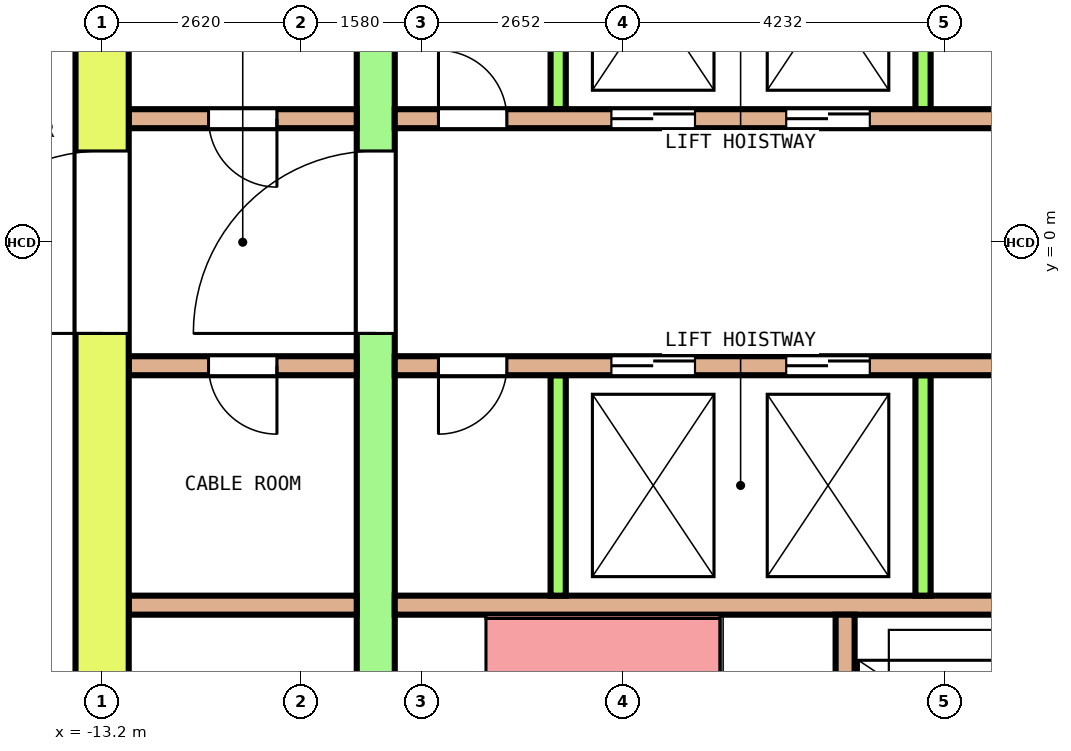
"""IFC4 building model, lengths in metres.
Left out: names, types, materials, properties, quantities, classifications, styles, units other than length and angle.
Written with IfcOpenShell. Run it as: python <this file> out.ifc"""

import sys

from ifc_helpers import new_model, si_unit, direction, frame, frame_2d, origin, place, context, subcontext, project, spatial, rectangle, extrude, element, fill, save


model = new_model("IFC4")
c1 = context("Model", 3, precision=1e-05, world=origin(), true_north=direction((0.0, 1.0)))
c2 = subcontext(c1, "Body", "Model", "MODEL_VIEW")
j1 = project(units=[si_unit("LENGTHUNIT", "METRE"), si_unit("PLANEANGLEUNIT", "RADIAN")], contexts=[c1])
p1 = place(None, origin())
s1 = spatial("IfcSite", under=j1, at=p1, CompositionType="ELEMENT")
p2 = place(p1, origin())
s2 = spatial("IfcBuilding", under=s1, at=p2, CompositionType="ELEMENT")
p3 = place(p2, frame((0.0, 0.0, 176.0)))
s3 = spatial("IfcBuildingStorey", under=s2, at=p3, CompositionType="ELEMENT", Elevation=176.0)
p4 = place(p3, frame((-13.2, -7.75, 0.0), z_axis=(0.0, 0.0, 1.0), x_axis=(0.0, 1.0, 0.0)))
e1 = element("IfcWall", 1, at=p4, inside=s3, PredefinedType="SHEAR", context=c2, shape_type="SweptSolid", body=[
    extrude(rectangle(XDim=15.5, YDim=0.7, at=frame_2d((7.75, 0.0))), origin(), (0.0, 0.0, 1.0), 4.1),
])
p5 = place(p4, frame((6.55, 0.0, 0.0)))
e2 = element("IfcOpeningElement", 2, at=p5, cuts=e1, PredefinedType="OPENING", context=c2, shape_type="SweptSolid", body=[
    extrude(rectangle(XDim=2.4, YDim=2.1, at=frame_2d((1.2, 1.05))), frame((0.0, 0.36, 0.0), z_axis=(0.0, -1.0, 0.0), x_axis=(1.0, 0.0, 0.0)), (0.0, 0.0, 1.0), 0.72),
])
p6 = place(p4, frame((13.45, 0.0, 0.0)))
e3 = element("IfcOpeningElement", 3, at=p6, cuts=e1, PredefinedType="OPENING", context=c2, shape_type="SweptSolid", body=[
    extrude(rectangle(XDim=1.2, YDim=2.1, at=frame_2d((0.6, 1.05))), frame((0.0, 0.36, 0.0), z_axis=(0.0, -1.0, 0.0), x_axis=(1.0, 0.0, 0.0)), (0.0, 0.0, 1.0), 0.72),
])
p7 = place(p4, frame((0.85, 0.0, 0.0)))
e4 = element("IfcOpeningElement", 4, at=p7, cuts=e1, PredefinedType="OPENING", context=c2, shape_type="SweptSolid", body=[
    extrude(rectangle(XDim=1.2, YDim=2.1, at=frame_2d((0.6, 1.05))), frame((0.0, 0.36, 0.0), z_axis=(0.0, -1.0, 0.0), x_axis=(1.0, 0.0, 0.0)), (0.0, 0.0, 1.0), 0.72),
])
p8 = place(p3, frame((-9.6, -7.75, 0.0), z_axis=(0.0, 0.0, 1.0), x_axis=(0.0, 1.0, 0.0)))
e5 = element("IfcWall", 5, at=p8, inside=s3, PredefinedType="SHEAR", context=c2, shape_type="SweptSolid", body=[
    extrude(rectangle(XDim=15.5, YDim=0.5, at=frame_2d((7.75, 0.0))), origin(), (0.0, 0.0, 1.0), 4.1),
])
p9 = place(p8, frame((6.55, 0.0, 0.0)))
e6 = element("IfcOpeningElement", 6, at=p9, cuts=e5, PredefinedType="OPENING", context=c2, shape_type="SweptSolid", body=[
    extrude(rectangle(XDim=2.4, YDim=2.1, at=frame_2d((1.2, 1.05))), frame((0.0, 0.26, 0.0), z_axis=(0.0, -1.0, 0.0), x_axis=(1.0, 0.0, 0.0)), (0.0, 0.0, 1.0), 0.52),
])
p10 = place(p8, frame((13.45, 0.0, 0.0)))
e7 = element("IfcOpeningElement", 7, at=p10, cuts=e5, PredefinedType="OPENING", context=c2, shape_type="SweptSolid", body=[
    extrude(rectangle(XDim=1.2, YDim=2.1, at=frame_2d((0.6, 1.05))), frame((0.0, 0.26, 0.0), z_axis=(0.0, -1.0, 0.0), x_axis=(1.0, 0.0, 0.0)), (0.0, 0.0, 1.0), 0.52),
])
p11 = place(p8, frame((0.85, 0.0, 0.0)))
e8 = element("IfcOpeningElement", 8, at=p11, cuts=e5, PredefinedType="OPENING", context=c2, shape_type="SweptSolid", body=[
    extrude(rectangle(XDim=1.2, YDim=2.1, at=frame_2d((0.6, 1.05))), frame((0.0, 0.26, 0.0), z_axis=(0.0, -1.0, 0.0), x_axis=(1.0, 0.0, 0.0)), (0.0, 0.0, 1.0), 0.52),
])
p12 = place(p3, frame((-12.85, 1.625, 0.0), z_axis=(0.0, 0.0, 1.0), x_axis=(1.0, 0.0, 0.0)))
e9 = element("IfcWall", 9, at=p12, inside=s3, PredefinedType="SOLIDWALL", context=c2, shape_type="SweptSolid", body=[
    extrude(rectangle(XDim=3.0, YDim=0.25, at=frame_2d((1.5, 0.0))), origin(), (0.0, 0.0, 1.0), 4.1),
])
p13 = place(p12, frame((1.05, 0.0, 0.0)))
e10 = element("IfcOpeningElement", 10, at=p13, cuts=e9, PredefinedType="OPENING", context=c2, shape_type="SweptSolid", body=[
    extrude(rectangle(XDim=0.9, YDim=2.1, at=frame_2d((0.45, 1.05))), frame((0.0, 0.135, 0.0), z_axis=(0.0, -1.0, 0.0), x_axis=(1.0, 0.0, 0.0)), (0.0, 0.0, 1.0), 0.27),
])
p14 = place(p3, frame((-9.35, 1.625, 0.0), z_axis=(0.0, 0.0, 1.0), x_axis=(1.0, 0.0, 0.0)))
e11 = element("IfcWall", 11, at=p14, inside=s3, PredefinedType="SOLIDWALL", context=c2, shape_type="SweptSolid", body=[
    extrude(rectangle(XDim=18.7, YDim=0.25, at=frame_2d((9.35, 0.0))), origin(), (0.0, 0.0, 1.0), 4.1),
])
p15 = place(p14, frame((2.85, 0.0, 0.0)))
e12 = element("IfcOpeningElement", 12, at=p15, cuts=e11, PredefinedType="OPENING", context=c2, shape_type="SweptSolid", body=[
    extrude(rectangle(XDim=1.1, YDim=2.1, at=frame_2d((0.55, 1.05))), frame((0.0, 0.135, 0.0), z_axis=(0.0, -1.0, 0.0), x_axis=(1.0, 0.0, 0.0)), (0.0, 0.0, 1.0), 0.27),
])
p16 = place(p14, frame((5.15, 0.0, 0.0)))
e13 = element("IfcOpeningElement", 13, at=p16, cuts=e11, PredefinedType="OPENING", context=c2, shape_type="SweptSolid", body=[
    extrude(rectangle(XDim=1.1, YDim=2.1, at=frame_2d((0.55, 1.05))), frame((0.0, 0.135, 0.0), z_axis=(0.0, -1.0, 0.0), x_axis=(1.0, 0.0, 0.0)), (0.0, 0.0, 1.0), 0.27),
])
p17 = place(p14, frame((14.8, 0.0, 0.0)))
e14 = element("IfcOpeningElement", 14, at=p17, cuts=e11, PredefinedType="OPENING", context=c2, shape_type="SweptSolid", body=[
    extrude(rectangle(XDim=1.1, YDim=2.1, at=frame_2d((0.55, 1.05))), frame((0.0, 0.135, 0.0), z_axis=(0.0, -1.0, 0.0), x_axis=(1.0, 0.0, 0.0)), (0.0, 0.0, 1.0), 0.27),
])
p18 = place(p14, frame((0.575, 0.0, 0.0)))
e15 = element("IfcOpeningElement", 15, at=p18, cuts=e11, PredefinedType="OPENING", context=c2, shape_type="SweptSolid", body=[
    extrude(rectangle(XDim=0.9, YDim=2.1, at=frame_2d((0.45, 1.05))), frame((0.0, 0.135, 0.0), z_axis=(0.0, -1.0, 0.0), x_axis=(1.0, 0.0, 0.0)), (0.0, 0.0, 1.0), 0.27),
])
p19 = place(p14, frame((17.225, 0.0, 0.0)))
e16 = element("IfcOpeningElement", 16, at=p19, cuts=e11, PredefinedType="OPENING", context=c2, shape_type="SweptSolid", body=[
    extrude(rectangle(XDim=0.9, YDim=2.1, at=frame_2d((0.45, 1.05))), frame((0.0, 0.135, 0.0), z_axis=(0.0, -1.0, 0.0), x_axis=(1.0, 0.0, 0.0)), (0.0, 0.0, 1.0), 0.27),
])
for number, where, z_axis, x_axis in (
    (17, (-7.2, 1.75, 0.0), (0.0, 0.0, 1.0), (0.0, 1.0, 0.0)),
    (18, (-2.4, 1.75, 0.0), (0.0, 0.0, 1.0), (0.0, 1.0, 0.0)),
):
    element("IfcWall", number, at=place(p3, frame(where, z_axis=z_axis, x_axis=x_axis)), inside=s3, PredefinedType="SOLIDWALL", context=c2, shape_type="SweptSolid", body=[
        extrude(rectangle(XDim=2.9, YDim=0.2, at=frame_2d((1.45, 0.0))), origin(), (0.0, 0.0, 1.0), 4.1),
    ])
p20 = place(p3, frame((-12.85, -1.625, 0.0), z_axis=(0.0, 0.0, 1.0), x_axis=(1.0, 0.0, 0.0)))
e19 = element("IfcWall", 19, at=p20, inside=s3, PredefinedType="SOLIDWALL", context=c2, shape_type="SweptSolid", body=[
    extrude(rectangle(XDim=3.0, YDim=0.25, at=frame_2d((1.5, 0.0))), origin(), (0.0, 0.0, 1.0), 4.1),
])
p21 = place(p20, frame((1.05, 0.0, 0.0)))
e20 = element("IfcOpeningElement", 20, at=p21, cuts=e19, PredefinedType="OPENING", context=c2, shape_type="SweptSolid", body=[
    extrude(rectangle(XDim=0.9, YDim=2.1, at=frame_2d((0.45, 1.05))), frame((0.0, 0.135, 0.0), z_axis=(0.0, -1.0, 0.0), x_axis=(1.0, 0.0, 0.0)), (0.0, 0.0, 1.0), 0.27),
])
p22 = place(p3, frame((-9.35, -1.625, 0.0), z_axis=(0.0, 0.0, 1.0), x_axis=(1.0, 0.0, 0.0)))
e21 = element("IfcWall", 21, at=p22, inside=s3, PredefinedType="SOLIDWALL", context=c2, shape_type="SweptSolid", body=[
    extrude(rectangle(XDim=18.7, YDim=0.25, at=frame_2d((9.35, 0.0))), origin(), (0.0, 0.0, 1.0), 4.1),
])
p23 = place(p22, frame((2.85, 0.0, 0.0)))
e22 = element("IfcOpeningElement", 22, at=p23, cuts=e21, PredefinedType="OPENING", context=c2, shape_type="SweptSolid", body=[
    extrude(rectangle(XDim=1.1, YDim=2.1, at=frame_2d((0.55, 1.05))), frame((0.0, 0.135, 0.0), z_axis=(0.0, -1.0, 0.0), x_axis=(1.0, 0.0, 0.0)), (0.0, 0.0, 1.0), 0.27),
])
p24 = place(p22, frame((5.15, 0.0, 0.0)))
e23 = element("IfcOpeningElement", 23, at=p24, cuts=e21, PredefinedType="OPENING", context=c2, shape_type="SweptSolid", body=[
    extrude(rectangle(XDim=1.1, YDim=2.1, at=frame_2d((0.55, 1.05))), frame((0.0, 0.135, 0.0), z_axis=(0.0, -1.0, 0.0), x_axis=(1.0, 0.0, 0.0)), (0.0, 0.0, 1.0), 0.27),
])
p25 = place(p22, frame((14.8, 0.0, 0.0)))
e24 = element("IfcOpeningElement", 24, at=p25, cuts=e21, PredefinedType="OPENING", context=c2, shape_type="SweptSolid", body=[
    extrude(rectangle(XDim=1.1, YDim=2.1, at=frame_2d((0.55, 1.05))), frame((0.0, 0.135, 0.0), z_axis=(0.0, -1.0, 0.0), x_axis=(1.0, 0.0, 0.0)), (0.0, 0.0, 1.0), 0.27),
])
p26 = place(p22, frame((0.575, 0.0, 0.0)))
e25 = element("IfcOpeningElement", 25, at=p26, cuts=e21, PredefinedType="OPENING", context=c2, shape_type="SweptSolid", body=[
    extrude(rectangle(XDim=0.9, YDim=2.1, at=frame_2d((0.45, 1.05))), frame((0.0, 0.135, 0.0), z_axis=(0.0, -1.0, 0.0), x_axis=(1.0, 0.0, 0.0)), (0.0, 0.0, 1.0), 0.27),
])
p27 = place(p22, frame((17.225, 0.0, 0.0)))
e26 = element("IfcOpeningElement", 26, at=p27, cuts=e21, PredefinedType="OPENING", context=c2, shape_type="SweptSolid", body=[
    extrude(rectangle(XDim=0.9, YDim=2.1, at=frame_2d((0.45, 1.05))), frame((0.0, 0.135, 0.0), z_axis=(0.0, -1.0, 0.0), x_axis=(1.0, 0.0, 0.0)), (0.0, 0.0, 1.0), 0.27),
])
p28 = place(p3, frame((-12.85, -4.775, 0.0), z_axis=(0.0, 0.0, 1.0), x_axis=(1.0, 0.0, 0.0)))
e27 = element("IfcWall", 27, at=p28, inside=s3, PredefinedType="SOLIDWALL", context=c2, shape_type="SweptSolid", body=[
    extrude(rectangle(XDim=3.0, YDim=0.25, at=frame_2d((1.5, 0.0))), origin(), (0.0, 0.0, 1.0), 4.1),
])
p29 = place(p3, frame((-9.35, -4.775, 0.0), z_axis=(0.0, 0.0, 1.0), x_axis=(1.0, 0.0, 0.0)))
e28 = element("IfcWall", 28, at=p29, inside=s3, PredefinedType="SOLIDWALL", context=c2, shape_type="SweptSolid", body=[
    extrude(rectangle(XDim=18.7, YDim=0.25, at=frame_2d((9.35, 0.0))), origin(), (0.0, 0.0, 1.0), 4.1),
])
for number, where, z_axis, x_axis in (
    (29, (-7.2, -4.65, 0.0), (0.0, 0.0, 1.0), (0.0, 1.0, 0.0)),
    (30, (-2.4, -4.65, 0.0), (0.0, 0.0, 1.0), (0.0, 1.0, 0.0)),
):
    element("IfcWall", number, at=place(p3, frame(where, z_axis=z_axis, x_axis=x_axis)), inside=s3, PredefinedType="SOLIDWALL", context=c2, shape_type="SweptSolid", body=[
        extrude(rectangle(XDim=2.9, YDim=0.2, at=frame_2d((1.45, 0.0))), origin(), (0.0, 0.0, 1.0), 4.1),
    ])
p30 = place(p3, frame((-3.425, -7.75, 0.0), z_axis=(0.0, 0.0, 1.0), x_axis=(0.0, 1.0, 0.0)))
e31 = element("IfcWall", 31, at=p30, inside=s3, PredefinedType="SOLIDWALL", context=c2, shape_type="SweptSolid", body=[
    extrude(rectangle(XDim=2.85, YDim=0.25, at=frame_2d((1.425, 0.0))), origin(), (0.0, 0.0, 1.0), 4.1),
])
p31 = place(p15, origin())
e32 = element("IfcDoor", 32, at=p31, inside=s3, OperationType="DOUBLE_DOOR_SLIDING", PredefinedType="DOOR", context=c2, shape_type="SweptSolid", body=[
    extrude(rectangle(XDim=1.1, YDim=2.1, at=frame_2d((0.55, 1.05))), frame((0.0, 0.075, 0.0), z_axis=(0.0, -1.0, 0.0), x_axis=(1.0, 0.0, 0.0)), (0.0, 0.0, 1.0), 0.15),
])
fill(e12, e32)
p32 = place(p16, origin())
e33 = element("IfcDoor", 33, at=p32, inside=s3, OperationType="DOUBLE_DOOR_SLIDING", PredefinedType="DOOR", context=c2, shape_type="SweptSolid", body=[
    extrude(rectangle(XDim=1.1, YDim=2.1, at=frame_2d((0.55, 1.05))), frame((0.0, 0.075, 0.0), z_axis=(0.0, -1.0, 0.0), x_axis=(1.0, 0.0, 0.0)), (0.0, 0.0, 1.0), 0.15),
])
fill(e13, e33)
p33 = place(p23, origin())
e34 = element("IfcDoor", 34, at=p33, inside=s3, OperationType="DOUBLE_DOOR_SLIDING", PredefinedType="DOOR", context=c2, shape_type="SweptSolid", body=[
    extrude(rectangle(XDim=1.1, YDim=2.1, at=frame_2d((0.55, 1.05))), frame((0.0, 0.075, 0.0), z_axis=(0.0, -1.0, 0.0), x_axis=(1.0, 0.0, 0.0)), (0.0, 0.0, 1.0), 0.15),
])
fill(e22, e34)
p34 = place(p24, origin())
e35 = element("IfcDoor", 35, at=p34, inside=s3, OperationType="DOUBLE_DOOR_SLIDING", PredefinedType="DOOR", context=c2, shape_type="SweptSolid", body=[
    extrude(rectangle(XDim=1.1, YDim=2.1, at=frame_2d((0.55, 1.05))), frame((0.0, 0.075, 0.0), z_axis=(0.0, -1.0, 0.0), x_axis=(1.0, 0.0, 0.0)), (0.0, 0.0, 1.0), 0.15),
])
fill(e23, e35)
p35 = place(p9, origin())
e36 = element("IfcDoor", 36, at=p35, inside=s3, OperationType="DOUBLE_DOOR_SINGLE_SWING", PredefinedType="DOOR", context=c2, shape_type="SweptSolid", body=[
    extrude(rectangle(XDim=2.4, YDim=2.1, at=frame_2d((1.2, 1.05))), frame((0.0, 0.2, 0.0), z_axis=(0.0, -1.0, 0.0), x_axis=(1.0, 0.0, 0.0)), (0.0, 0.0, 1.0), 0.4),
])
fill(e6, e36)
p36 = place(p5, origin())
e37 = element("IfcDoor", 37, at=p36, inside=s3, OperationType="DOUBLE_DOOR_SINGLE_SWING", PredefinedType="DOOR", context=c2, shape_type="SweptSolid", body=[
    extrude(rectangle(XDim=2.4, YDim=2.1, at=frame_2d((1.2, 1.05))), frame((0.0, 0.3, 0.0), z_axis=(0.0, -1.0, 0.0), x_axis=(1.0, 0.0, 0.0)), (0.0, 0.0, 1.0), 0.6),
])
fill(e2, e37)
p37 = place(p13, origin())
e38 = element("IfcDoor", 38, at=p37, inside=s3, OperationType="SINGLE_SWING_LEFT", PredefinedType="DOOR", context=c2, shape_type="SweptSolid", body=[
    extrude(rectangle(XDim=0.9, YDim=2.1, at=frame_2d((0.45, 1.05))), frame((0.0, 0.075, 0.0), z_axis=(0.0, -1.0, 0.0), x_axis=(1.0, 0.0, 0.0)), (0.0, 0.0, 1.0), 0.15),
])
fill(e10, e38)
p38 = place(p18, origin())
e39 = element("IfcDoor", 39, at=p38, inside=s3, OperationType="SINGLE_SWING_RIGHT", PredefinedType="DOOR", context=c2, shape_type="SweptSolid", body=[
    extrude(rectangle(XDim=0.9, YDim=2.1, at=frame_2d((0.45, 1.05))), frame((0.0, 0.075, 0.0), z_axis=(0.0, -1.0, 0.0), x_axis=(1.0, 0.0, 0.0)), (0.0, 0.0, 1.0), 0.15),
])
fill(e15, e39)
p39 = place(p21, origin())
e40 = element("IfcDoor", 40, at=p39, inside=s3, OperationType="SINGLE_SWING_LEFT", PredefinedType="DOOR", context=c2, shape_type="SweptSolid", body=[
    extrude(rectangle(XDim=0.9, YDim=2.1, at=frame_2d((0.45, 1.05))), frame((0.0, 0.075, 0.0), z_axis=(0.0, -1.0, 0.0), x_axis=(1.0, 0.0, 0.0)), (0.0, 0.0, 1.0), 0.15),
])
fill(e20, e40)
p40 = place(p26, origin())
e41 = element("IfcDoor", 41, at=p40, inside=s3, OperationType="SINGLE_SWING_RIGHT", PredefinedType="DOOR", context=c2, shape_type="SweptSolid", body=[
    extrude(rectangle(XDim=0.9, YDim=2.1, at=frame_2d((0.45, 1.05))), frame((0.0, 0.075, 0.0), z_axis=(0.0, -1.0, 0.0), x_axis=(1.0, 0.0, 0.0)), (0.0, 0.0, 1.0), 0.15),
])
fill(e25, e41)
save(model, sys.argv[1])
